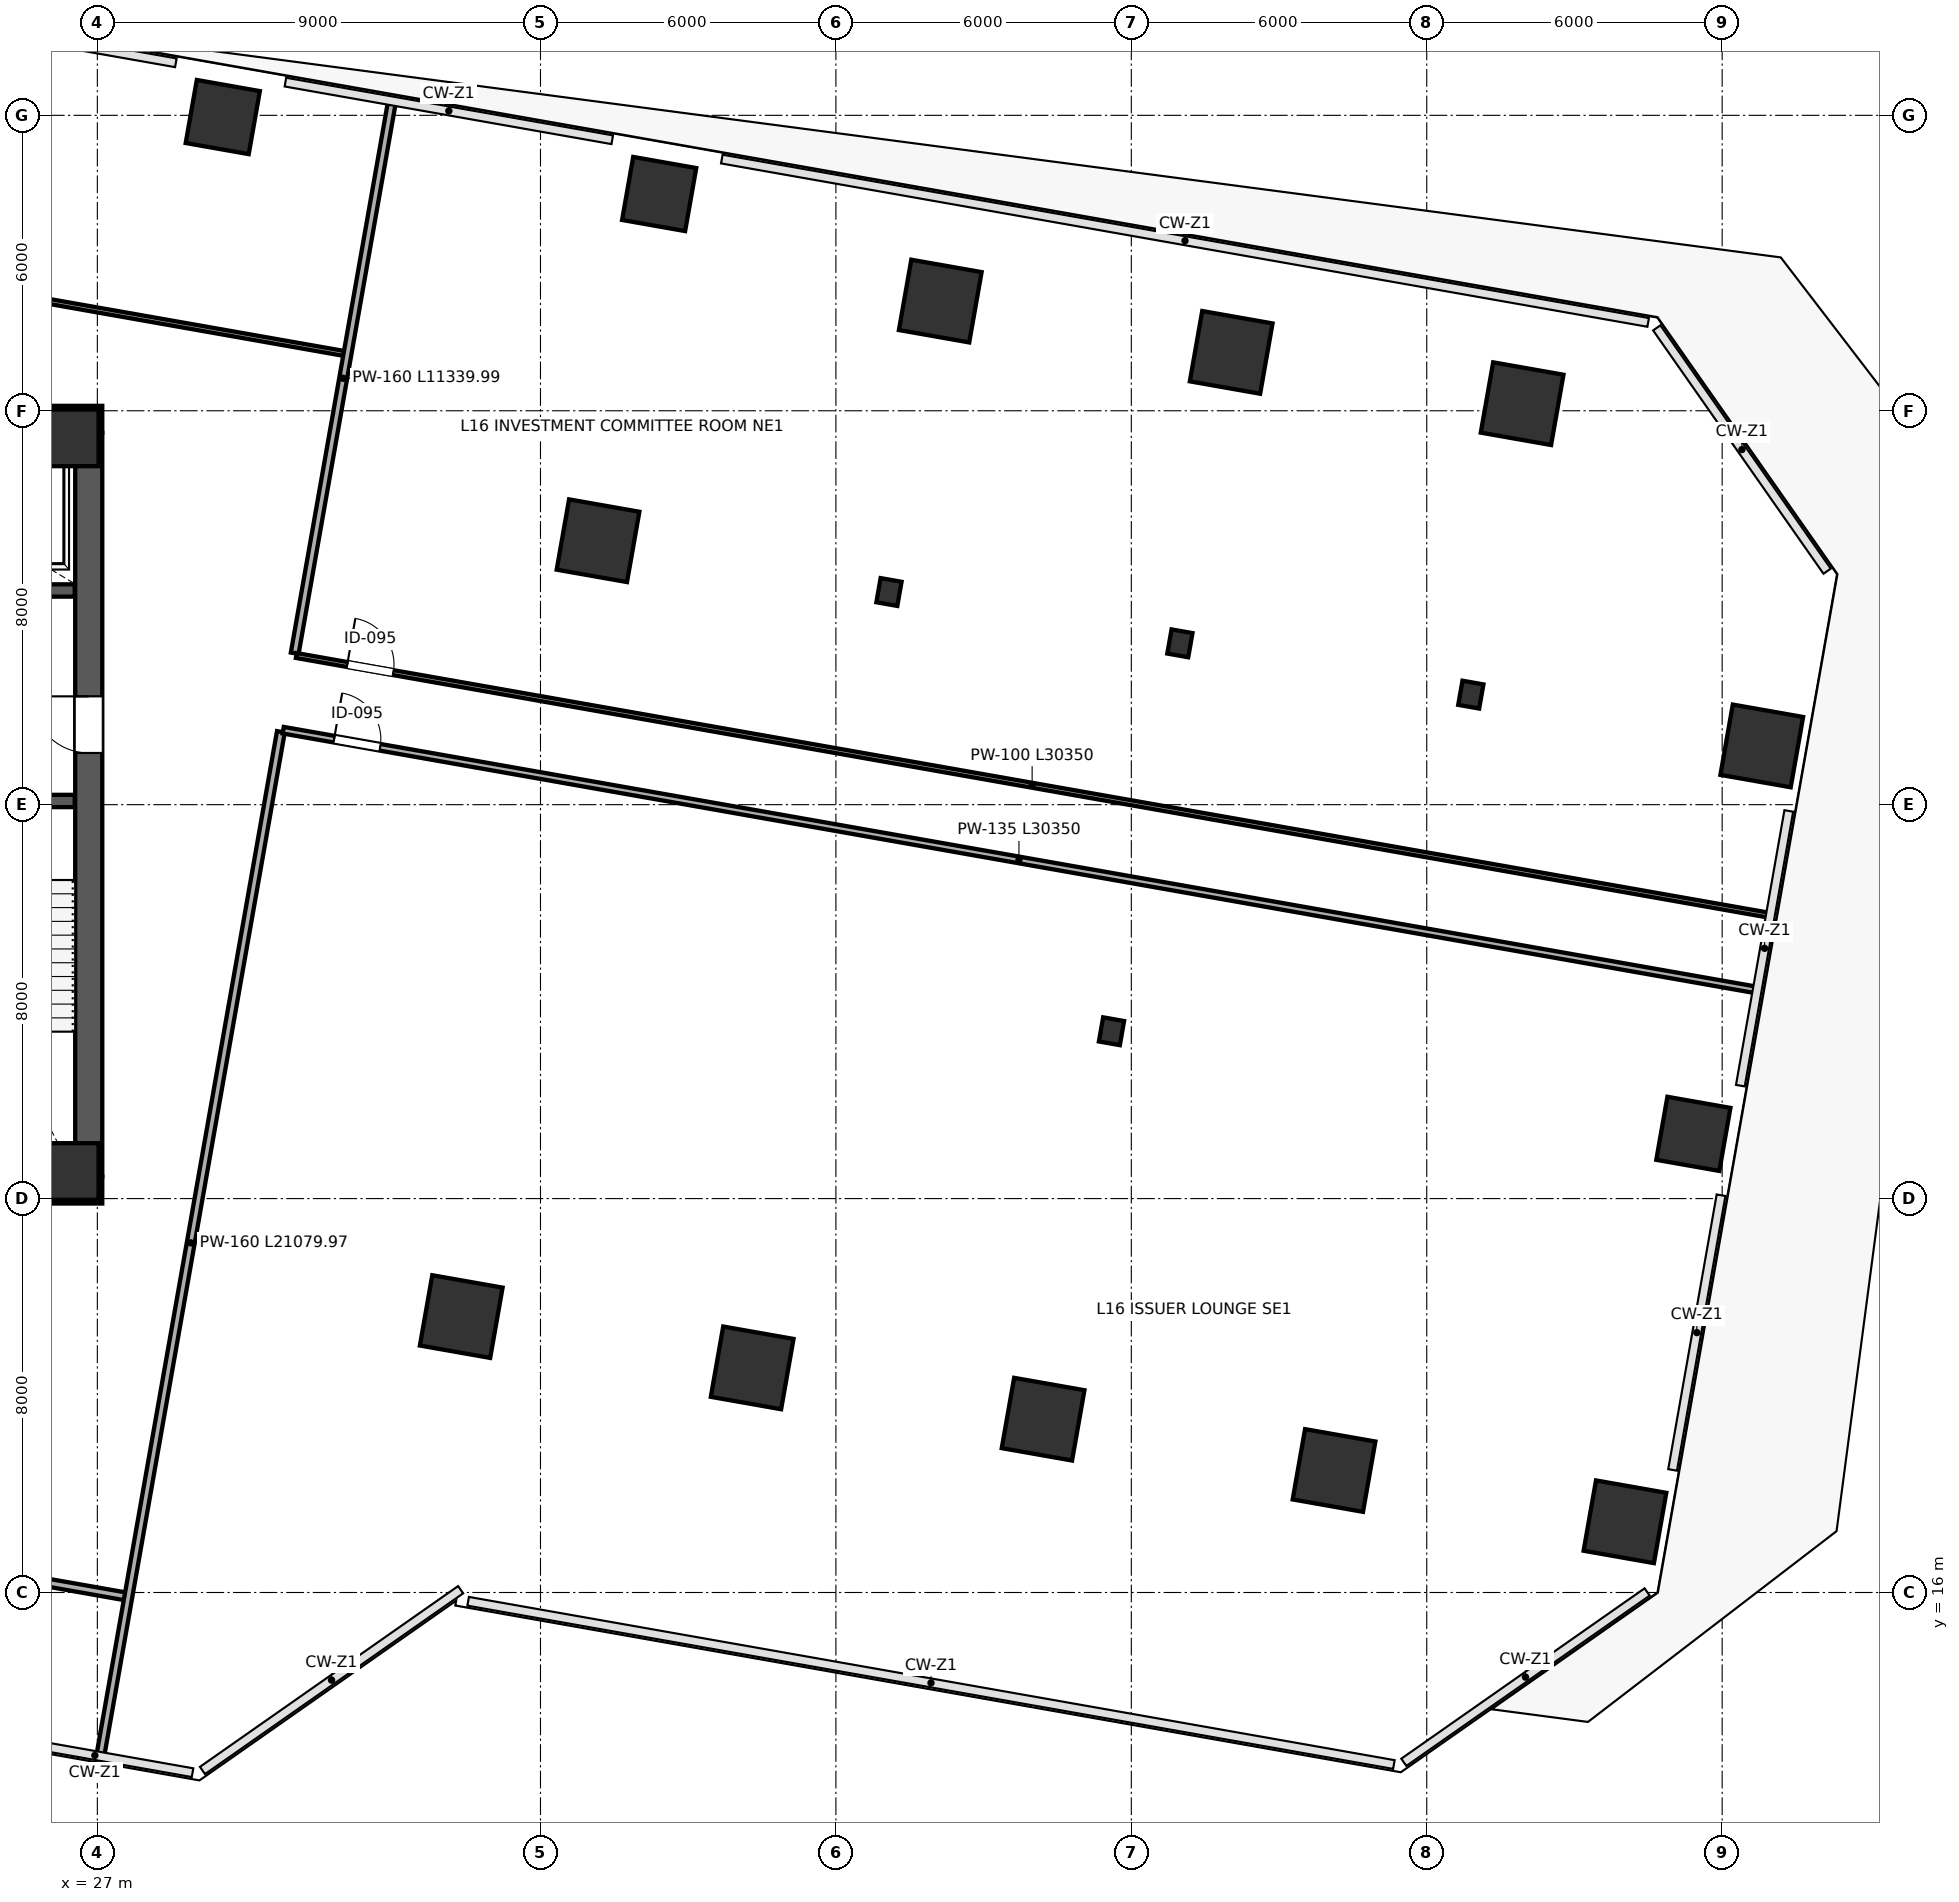
"""IFC4 building model, lengths in metres.
Left out: names, types, materials, properties, quantities, classifications, styles, units other than length and angle.
Written with IfcOpenShell. Run it as: python <this file> out.ifc"""

import sys

from ifc_helpers import new_model, si_unit, direction, frame, frame_2d, origin, origin_2d, place, context, subcontext, project, spatial, rectangle, i_section, extrude, source, transform, mapped, element, fill, save


model = new_model("IFC4")
c1 = context("Model", 3, precision=1e-05, world=origin(), true_north=direction((0.0, 1.0)))
c2 = subcontext(c1, "Body", "Model", "MODEL_VIEW")
j1 = project(units=[si_unit("LENGTHUNIT", "METRE"), si_unit("PLANEANGLEUNIT", "RADIAN")], contexts=[c1])
p1 = place(None, origin())
s1 = spatial("IfcSite", under=j1, at=p1, CompositionType="ELEMENT")
p2 = place(p1, origin())
s2 = spatial("IfcBuilding", under=s1, at=p2, CompositionType="ELEMENT")
p3 = place(p2, frame((0.0, 0.0, 74.8)))
s3 = spatial("IfcBuildingStorey", under=s2, at=p3, CompositionType="ELEMENT", Elevation=74.8)
m1 = source(origin(), c2, "Body", "SweptSolid", [
    extrude(rectangle(XDim=1.15, YDim=1.15, at=origin_2d()), origin(), (0.0, 0.0, 1.0), 4.198),
])
for number, where, z_axis, x_axis in (
    (1, (26.45, 24.55, 0.001), (0.0, 0.0, 1.0), (1.0, 0.0, 0.0)),
    (2, (26.45, 39.45, 0.001), (0.0, 0.0, 1.0), (1.0, 0.0, 0.0)),
):
    element("IfcColumn", number, at=place(p3, frame(where, z_axis=z_axis, x_axis=x_axis)), inside=s3, PredefinedType="COLUMN", context=c2, shape_type="MappedRepresentation", body=[
        mapped(m1, transform((0.0, 0.0, 0.0), scale=1.0)),
    ])
m2 = source(origin(), c2, "Body", "SweptSolid", [
    extrude(rectangle(XDim=1.3, YDim=1.3, at=origin_2d()), origin(), (0.0, 0.0, 1.0), 4.198),
])
p4 = place(p3, frame((29.547, 45.965, 0.001), z_axis=(0.0, 0.0, 1.0), x_axis=(-0.984807753012, 0.173648177667, 0.0)))
e3 = element("IfcColumn", 3, at=p4, inside=s3, PredefinedType="COLUMN", context=c2, shape_type="MappedRepresentation", body=[
    mapped(m2, transform((0.0, 0.0, 0.0), scale=1.0)),
])
m3 = source(origin(), c2, "Body", "SweptSolid", [
    extrude(rectangle(XDim=1.45, YDim=1.45, at=origin_2d()), origin(), (0.0, 0.0, 1.0), 4.198),
])
for number, where, z_axis, x_axis in (
    (4, (34.39, 21.604, 0.001), (0.0, 0.0, 1.0), (-0.985, 0.174, 0.0)),
    (5, (37.169, 37.361, 0.001), (0.0, 0.0, 1.0), (-0.985, 0.174, 0.0)),
):
    element("IfcColumn", number, at=place(p3, frame(where, z_axis=z_axis, x_axis=x_axis)), inside=s3, PredefinedType="COLUMN", context=c2, shape_type="MappedRepresentation", body=[
        mapped(m3, transform((0.0, 0.0, 0.0), scale=1.0)),
    ])
p5 = place(p3, frame((38.41, 44.402, 0.001), z_axis=(0.0, 0.0, 1.0), x_axis=(-0.984807753012, 0.173648177667, 0.0)))
e6 = element("IfcColumn", 6, at=p5, inside=s3, PredefinedType="COLUMN", context=c2, shape_type="MappedRepresentation", body=[
    mapped(m2, transform((0.0, 0.0, 0.0), scale=1.0)),
])
p6 = place(p3, frame((40.299, 20.562, 0.001), z_axis=(0.0, 0.0, 1.0), x_axis=(-0.984807753012, 0.173648177667, 0.0)))
e7 = element("IfcColumn", 7, at=p6, inside=s3, PredefinedType="COLUMN", context=c2, shape_type="MappedRepresentation", body=[
    mapped(m3, transform((0.0, 0.0, 0.0), scale=1.0)),
])
m4 = source(origin(), c2, "Body", "SweptSolid", [
    extrude(i_section(OverallWidth=0.432, OverallDepth=0.498, WebThickness=0.056, FlangeThickness=0.089, FilletRadius=0.015, at=origin_2d()), origin(), (0.0, 0.0, 1.0), 4.198),
])
p7 = place(p3, frame((43.078, 36.319, 0.001), z_axis=(0.0, 0.0, 1.0), x_axis=(-0.984807753012, 0.173648177667, 0.0)))
e8 = element("IfcColumn", 8, at=p7, inside=s3, PredefinedType="COLUMN", context=c2, shape_type="MappedRepresentation", body=[
    mapped(m4, transform((0.0, 0.0, 0.0), scale=1.0)),
])
for number, where, z_axis, x_axis in (
    (9, (44.12, 42.228, 0.001), (0.0, 0.0, 1.0), (-0.985, 0.174, 0.0)),
    (10, (46.208, 19.52, 0.001), (0.0, 0.0, 1.0), (-0.985, 0.174, 0.0)),
):
    element("IfcColumn", number, at=place(p3, frame(where, z_axis=z_axis, x_axis=x_axis)), inside=s3, PredefinedType="COLUMN", context=c2, shape_type="MappedRepresentation", body=[
        mapped(m3, transform((0.0, 0.0, 0.0), scale=1.0)),
    ])
for number, where, z_axis, x_axis in (
    (11, (47.597, 27.398, 0.001), (0.0, 0.0, 1.0), (-0.985, 0.174, 0.0)),
    (12, (48.987, 35.277, 0.001), (0.0, 0.0, 1.0), (-0.985, 0.174, 0.0)),
):
    element("IfcColumn", number, at=place(p3, frame(where, z_axis=z_axis, x_axis=x_axis)), inside=s3, PredefinedType="COLUMN", context=c2, shape_type="MappedRepresentation", body=[
        mapped(m4, transform((0.0, 0.0, 0.0), scale=1.0)),
    ])
for number, where, z_axis, x_axis in (
    (13, (50.029, 41.186, 0.001), (0.0, 0.0, 1.0), (-0.985, 0.174, 0.0)),
    (14, (52.117, 18.478, 0.001), (0.0, 0.0, 1.0), (-0.985, 0.174, 0.0)),
):
    element("IfcColumn", number, at=place(p3, frame(where, z_axis=z_axis, x_axis=x_axis)), inside=s3, PredefinedType="COLUMN", context=c2, shape_type="MappedRepresentation", body=[
        mapped(m3, transform((0.0, 0.0, 0.0), scale=1.0)),
    ])
p8 = place(p3, frame((54.896, 34.235, 0.001), z_axis=(0.0, 0.0, 1.0), x_axis=(-0.984807753012, 0.173648177667, 0.0)))
e15 = element("IfcColumn", 15, at=p8, inside=s3, PredefinedType="COLUMN", context=c2, shape_type="MappedRepresentation", body=[
    mapped(m4, transform((0.0, 0.0, 0.0), scale=1.0)),
])
p9 = place(p3, frame((55.937, 40.144, 0.001), z_axis=(0.0, 0.0, 1.0), x_axis=(-0.984807753012, 0.173648177667, 0.0)))
e16 = element("IfcColumn", 16, at=p9, inside=s3, PredefinedType="COLUMN", context=c2, shape_type="MappedRepresentation", body=[
    mapped(m3, transform((0.0, 0.0, 0.0), scale=1.0)),
])
m5 = source(origin(), c2, "Body", "SweptSolid", [
    extrude(rectangle(XDim=1.45, YDim=1.45, at=origin_2d()), origin(), (0.0, 0.0, 1.0), 4.198),
])
p10 = place(p3, frame((58.026, 17.436, 0.001), z_axis=(0.0, 0.0, 1.0), x_axis=(-0.984807753012, 0.173648177667, 0.0)))
e17 = element("IfcColumn", 17, at=p10, inside=s3, PredefinedType="COLUMN", context=c2, shape_type="MappedRepresentation", body=[
    mapped(m5, transform((0.0, 0.0, 0.0), scale=1.0)),
])
p11 = place(p3, frame((59.415, 25.314, 0.001), z_axis=(0.0, 0.0, 1.0), x_axis=(-0.984807753012, 0.173648177667, 0.0)))
e18 = element("IfcColumn", 18, at=p11, inside=s3, PredefinedType="COLUMN", context=c2, shape_type="MappedRepresentation", body=[
    mapped(m2, transform((0.0, 0.0, 0.0), scale=1.0)),
])
p12 = place(p3, frame((60.804, 33.193, 0.001), z_axis=(0.0, 0.0, 1.0), x_axis=(-0.984807753012, 0.173648177667, 0.0)))
e19 = element("IfcColumn", 19, at=p12, inside=s3, PredefinedType="COLUMN", context=c2, shape_type="MappedRepresentation", body=[
    mapped(m5, transform((0.0, 0.0, 0.0), scale=1.0)),
])
p13 = place(p3, frame((26.825, 24.45, 0.0), z_axis=(0.0, 0.0, 1.0), x_axis=(0.0, 1.0, 0.0)))
e20 = element("IfcWall", 20, at=p13, inside=s3, PredefinedType="SHEAR", context=c2, shape_type="SweptSolid", body=[
    extrude(rectangle(XDim=15.1, YDim=0.55, at=frame_2d((7.55, 0.0))), origin(), (0.0, 0.0, 1.0), 3.96),
])
p14 = place(p13, frame((8.6, 0.0, 0.0)))
e21 = element("IfcOpeningElement", 21, at=p14, cuts=e20, PredefinedType="OPENING", context=c2, shape_type="SweptSolid", body=[
    extrude(rectangle(XDim=1.15, YDim=2.2, at=frame_2d((0.575, 1.1))), frame((0.0, 0.285, 0.0), z_axis=(0.0, -1.0, 0.0), x_axis=(1.0, 0.0, 0.0)), (0.0, 0.0, 1.0), 0.57),
])
for number, where, z_axis, x_axis in (
    (22, (8.9, 24.175, 0.0), (0.0, 0.0, 1.0), (1.0, 0.0, 0.0)),
    (23, (8.9, 39.825, 0.0), (0.0, 0.0, 1.0), (1.0, 0.0, 0.0)),
):
    element("IfcWall", number, at=place(p3, frame(where, z_axis=z_axis, x_axis=x_axis)), inside=s3, PredefinedType="SHEAR", context=c2, shape_type="SweptSolid", body=[
        extrude(rectangle(XDim=18.2, YDim=0.55, at=frame_2d((9.1, 0.0))), origin(), (0.0, 0.0, 1.0), 3.96),
    ])
p15 = place(p3, frame((23.19, 32.075, 0.0), z_axis=(0.0, 0.0, 1.0), x_axis=(1.0, 0.0, 0.0)))
e24 = element("IfcWall", 24, at=p15, inside=s3, PredefinedType="SHEAR", context=c2, shape_type="SweptSolid", body=[
    extrude(rectangle(XDim=3.35, YDim=0.25, at=frame_2d((1.675, 0.0))), origin(), (0.0, 0.0, 1.0), 3.96),
])
p16 = place(p15, frame((0.85, 0.0, 0.0)))
e25 = element("IfcOpeningElement", 25, at=p16, cuts=e24, PredefinedType="OPENING", context=c2, shape_type="SweptSolid", body=[
    extrude(rectangle(XDim=1.15, YDim=2.2, at=frame_2d((0.575, 1.1))), frame((0.0, 0.135, 0.0), z_axis=(0.0, -1.0, 0.0), x_axis=(1.0, 0.0, 0.0)), (0.0, 0.0, 1.0), 0.27),
])
p17 = place(p3, frame((21.45, 36.35, 0.0), z_axis=(0.0, 0.0, 1.0), x_axis=(1.0, 0.0, 0.0)))
e26 = element("IfcWall", 26, at=p17, inside=s3, PredefinedType="SHEAR", context=c2, shape_type="SweptSolid", body=[
    extrude(rectangle(XDim=5.09, YDim=0.25, at=frame_2d((2.545, 0.0))), origin(), (0.0, 0.0, 1.0), 3.96),
])
p18 = place(p17, frame((0.7, 0.0, 0.0)))
e27 = element("IfcOpeningElement", 27, at=p18, cuts=e26, PredefinedType="OPENING", context=c2, shape_type="SweptSolid", body=[
    extrude(rectangle(XDim=1.2, YDim=2.2, at=frame_2d((0.6, 1.1))), frame((0.0, 0.135, 0.0), z_axis=(0.0, -1.0, 0.0), x_axis=(1.0, 0.0, 0.0)), (0.0, 0.0, 1.0), 0.27),
])
p19 = place(p17, frame((3.25, 0.0, 0.0)))
e28 = element("IfcOpeningElement", 28, at=p19, cuts=e26, PredefinedType="OPENING", context=c2, shape_type="SweptSolid", body=[
    extrude(rectangle(XDim=1.2, YDim=2.2, at=frame_2d((0.6, 1.1))), frame((0.0, 0.135, 0.0), z_axis=(0.0, -1.0, 0.0), x_axis=(1.0, 0.0, 0.0)), (0.0, 0.0, 1.0), 0.27),
])
p20 = place(p3, frame((9.765, 19.061, 0.0), z_axis=(0.0, 0.0, 1.0), x_axis=(0.984807312871, -0.173650673815, 0.0)))
e29 = element("IfcWall", 29, at=p20, inside=s3, PredefinedType="PARTITIONING", context=c2, shape_type="SweptSolid", body=[
    extrude(rectangle(XDim=18.1, YDim=0.16, at=frame_2d((9.05, 0.0))), origin(), (0.0, 0.0, 1.0), 3.96),
])
p21 = place(p20, frame((1.45, 0.0, 0.0)))
e30 = element("IfcOpeningElement", 30, at=p21, cuts=e29, PredefinedType="OPENING", context=c2, shape_type="SweptSolid", body=[
    extrude(rectangle(XDim=0.95, YDim=2.15, at=frame_2d((0.475, 1.075))), frame((0.0, 0.09, 0.0), z_axis=(0.0, -1.0, 0.0), x_axis=(1.0, 0.0, 0.0)), (0.0, 0.0, 1.0), 0.18),
])
p22 = place(p3, frame((6.83, 45.604, 0.0), z_axis=(0.0, 0.0, 1.0), x_axis=(0.984806496121, -0.173655305701, 0.0)))
e31 = element("IfcWall", 31, at=p22, inside=s3, PredefinedType="PARTITIONING", context=c2, shape_type="SweptSolid", body=[
    extrude(rectangle(XDim=25.6, YDim=0.1, at=frame_2d((12.8, 0.0))), origin(), (0.0, 0.0, 1.0), 3.96),
])
p23 = place(p22, frame((1.05, 0.0, 0.0)))
e32 = element("IfcOpeningElement", 32, at=p23, cuts=e31, PredefinedType="OPENING", context=c2, shape_type="SweptSolid", body=[
    extrude(rectangle(XDim=0.95, YDim=2.15, at=frame_2d((0.475, 1.075))), frame((0.0, 0.06, 0.0), z_axis=(0.0, -1.0, 0.0), x_axis=(1.0, 0.0, 0.0)), (0.0, 0.0, 1.0), 0.12),
])
p24 = place(p3, frame((31.009, 35.076, 0.0), z_axis=(0.0, 0.0, 1.0), x_axis=(0.173653918008, 0.984806740818, 0.0)))
e33 = element("IfcWall", 33, at=p24, inside=s3, PredefinedType="PARTITIONING", context=c2, shape_type="SweptSolid", body=[
    extrude(rectangle(XDim=11.34, YDim=0.16, at=frame_2d((5.67, 0.0))), origin(), (0.0, 0.0, 1.0), 3.095),
])
p25 = place(p3, frame((27.067, 12.72, 0.0), z_axis=(0.0, 0.0, 1.0), x_axis=(0.173654514703, 0.984806635601, 0.0)))
e34 = element("IfcWall", 34, at=p25, inside=s3, PredefinedType="PARTITIONING", context=c2, shape_type="SweptSolid", body=[
    extrude(rectangle(XDim=21.08, YDim=0.16, at=frame_2d((10.54, 0.0))), origin(), (0.0, 0.0, 1.0), 3.96),
])
p26 = place(p3, frame((31.041, 35.029, 0.0), z_axis=(0.0, 0.0, 1.0), x_axis=(0.984807519997, -0.173649499156, 0.0)))
e35 = element("IfcWall", 35, at=p26, inside=s3, PredefinedType="PARTITIONING", context=c2, shape_type="SweptSolid", body=[
    extrude(rectangle(XDim=30.35, YDim=0.1, at=frame_2d((15.175, 0.0))), origin(), (0.0, 0.0, 1.0), 3.095),
])
p27 = place(p26, frame((1.05, 0.0, 0.0)))
e36 = element("IfcOpeningElement", 36, at=p27, cuts=e35, PredefinedType="OPENING", context=c2, shape_type="SweptSolid", body=[
    extrude(rectangle(XDim=0.95, YDim=2.15, at=frame_2d((0.475, 1.075))), frame((0.0, 0.06, 0.0), z_axis=(0.0, -1.0, 0.0), x_axis=(1.0, 0.0, 0.0)), (0.0, 0.0, 1.0), 0.12),
])
p28 = place(p3, frame((30.774, 33.513, 0.0), z_axis=(0.0, 0.0, 1.0), x_axis=(0.984807519997, -0.173649499156, 0.0)))
e37 = element("IfcWall", 37, at=p28, inside=s3, PredefinedType="PARTITIONING", context=c2, shape_type="SweptSolid", body=[
    extrude(rectangle(XDim=30.35, YDim=0.135, at=frame_2d((15.175, 0.0))), origin(), (0.0, 0.0, 1.0), 3.095),
])
p29 = place(p28, frame((1.05, 0.0, 0.0)))
e38 = element("IfcOpeningElement", 38, at=p29, cuts=e37, PredefinedType="OPENING", context=c2, shape_type="SweptSolid", body=[
    extrude(rectangle(XDim=0.95, YDim=2.15, at=frame_2d((0.475, 1.075))), frame((0.0, 0.078, 0.0), z_axis=(0.0, -1.0, 0.0), x_axis=(1.0, 0.0, 0.0)), (0.0, 0.0, 1.0), 0.155),
])
m6 = source(origin(), c2, "Body", "SweptSolid", [
    extrude(rectangle(XDim=1.15, YDim=2.2, at=frame_2d((0.575, 1.1))), frame((0.0, 0.025, 0.0), z_axis=(0.0, -1.0, 0.0), x_axis=(1.0, 0.0, 0.0)), (0.0, 0.0, 1.0), 0.05),
])
p30 = place(p14, origin())
e39 = element("IfcDoor", 39, at=p30, inside=s3, OperationType="SINGLE_SWING_RIGHT", PredefinedType="DOOR", context=c2, shape_type="MappedRepresentation", body=[
    mapped(m6, transform((0.0, 0.0, 0.0), scale=1.0)),
])
fill(e21, e39)
m7 = source(origin(), c2, "Body", "SweptSolid", [
    extrude(rectangle(XDim=0.95, YDim=2.15, at=frame_2d((0.475, 1.075))), frame((0.0, 0.025, 0.0), z_axis=(0.0, -1.0, 0.0), x_axis=(1.0, 0.0, 0.0)), (0.0, 0.0, 1.0), 0.05),
])
p31 = place(p27, origin())
e40 = element("IfcDoor", 40, at=p31, inside=s3, OperationType="SINGLE_SWING_LEFT", PredefinedType="DOOR", context=c2, shape_type="MappedRepresentation", body=[
    mapped(m7, transform((0.0, 0.0, 0.0), scale=1.0)),
])
fill(e36, e40)
p32 = place(p29, origin())
e41 = element("IfcDoor", 41, at=p32, inside=s3, OperationType="SINGLE_SWING_LEFT", PredefinedType="DOOR", context=c2, shape_type="MappedRepresentation", body=[
    mapped(m7, transform((0.0, 0.0, 0.0), scale=1.0)),
])
fill(e38, e41)
save(model, sys.argv[1])
